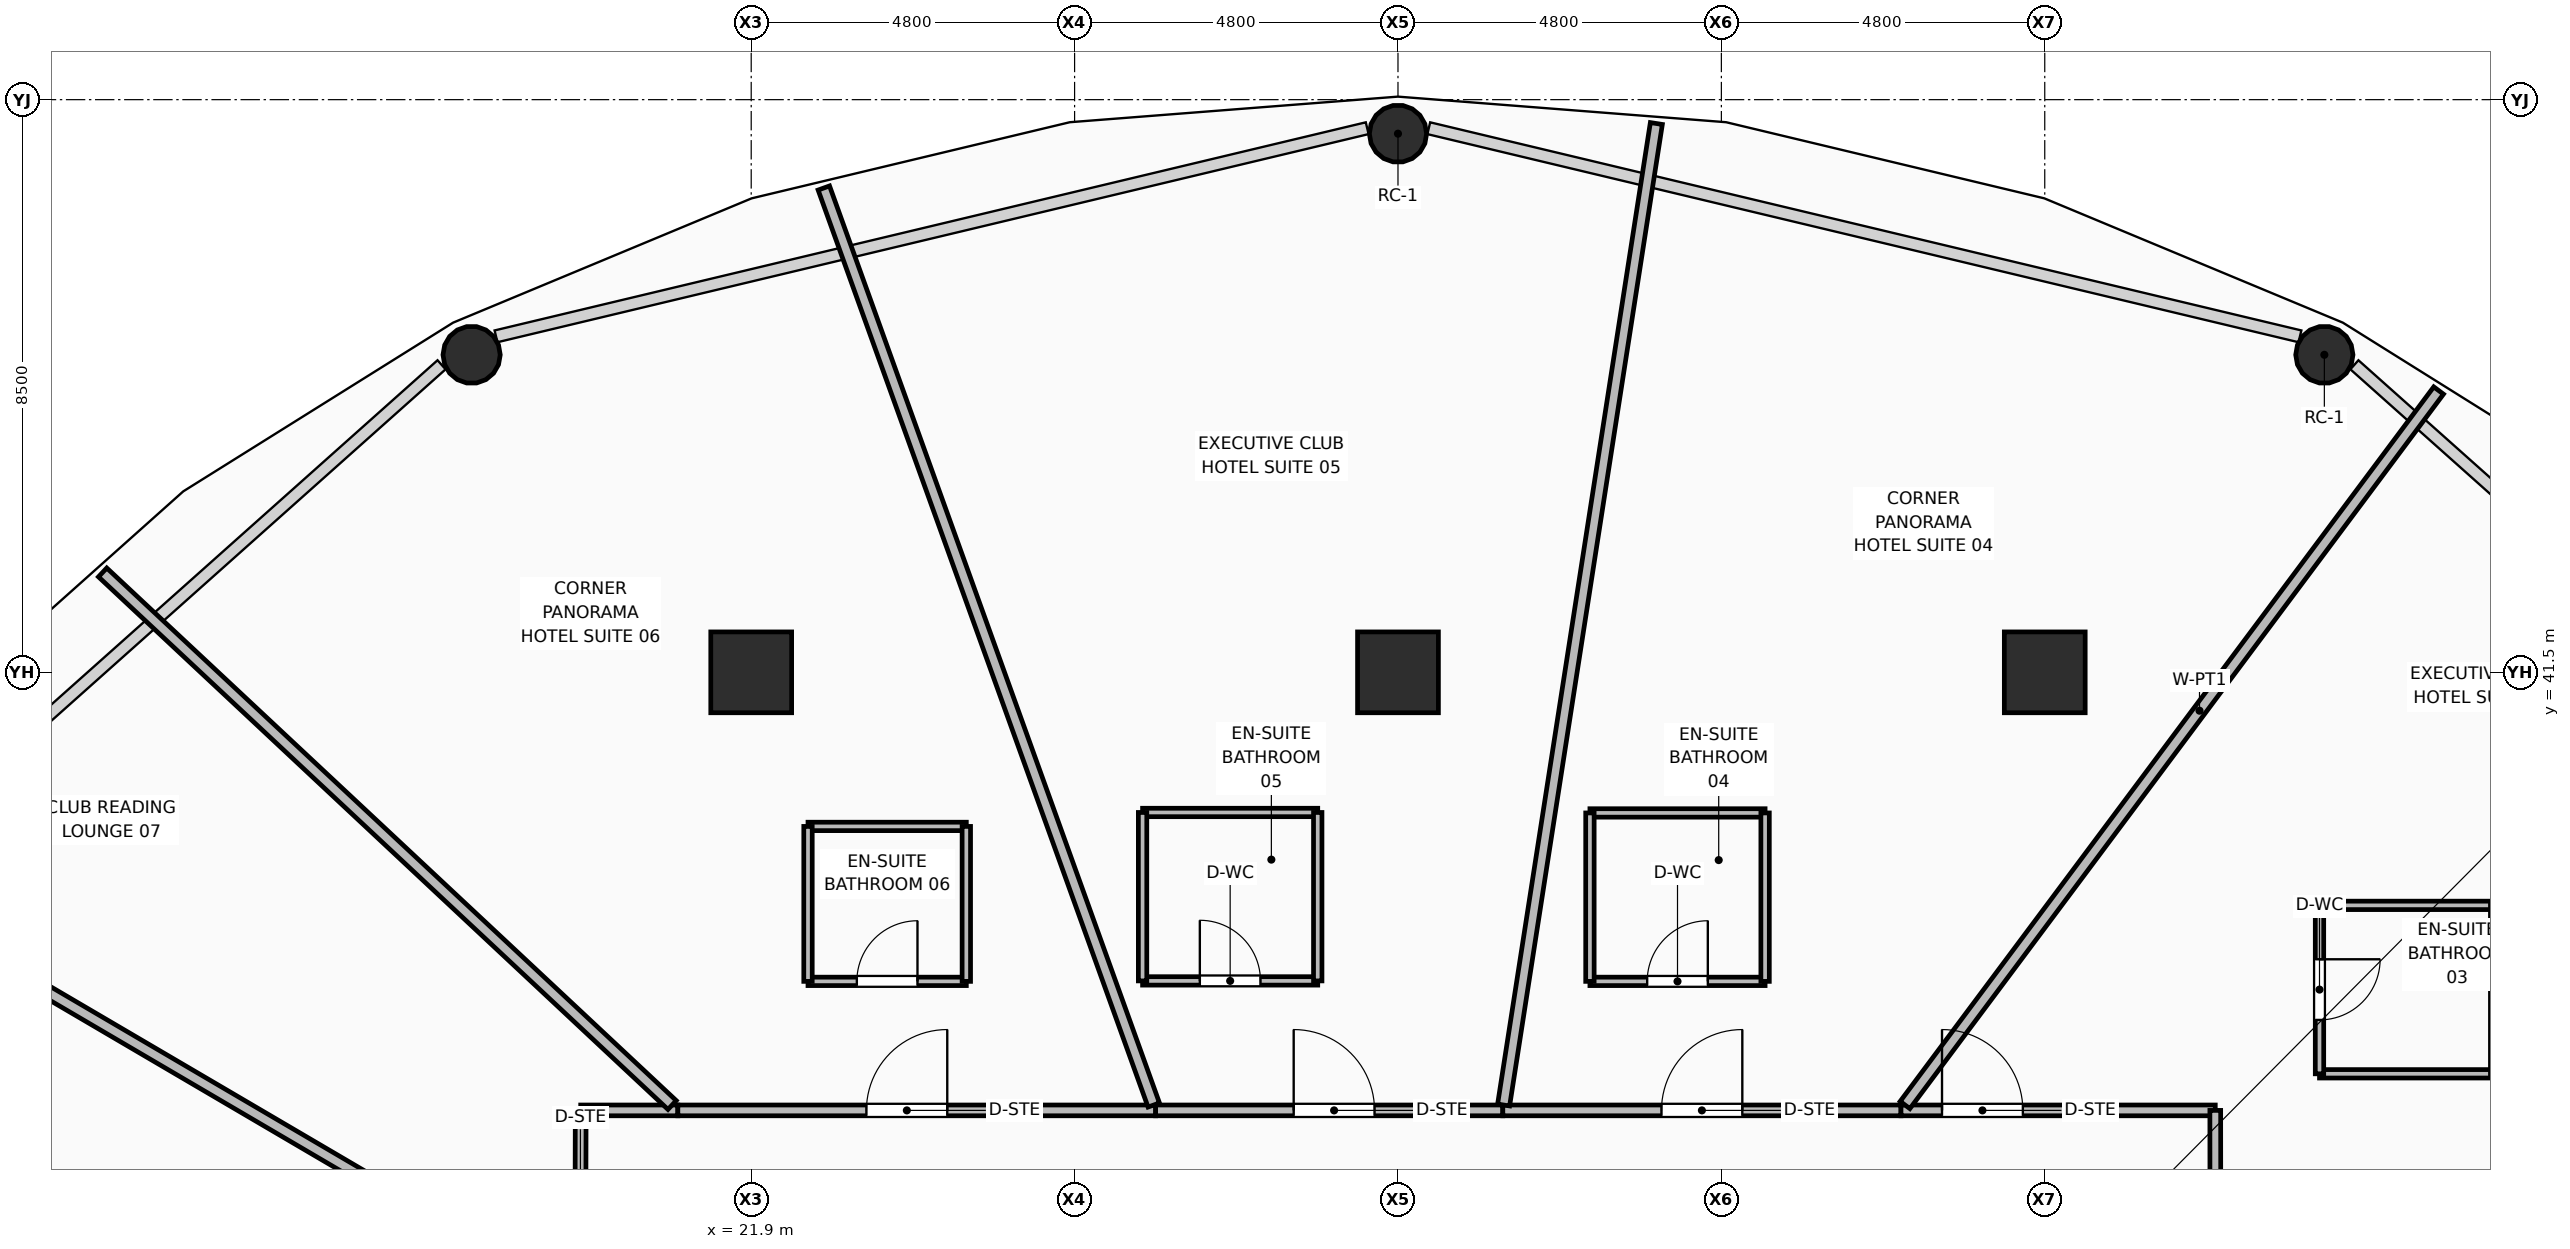
"""IFC4 building model, lengths in metres.
Left out: names, types, materials, properties, quantities, classifications, styles, units other than length and angle.
Written with IfcOpenShell. Run it as: python <this file> out.ifc"""

import sys

from ifc_helpers import new_model, si_unit, direction, frame, frame_2d, origin, origin_2d, place, context, subcontext, project, spatial, rectangle, hollow_rectangle, hollow_circle, extrude, element, fill, save


model = new_model("IFC4")
c1 = context("Model", 3, precision=1e-05, world=origin(), true_north=direction((0.0, 1.0)))
c2 = subcontext(c1, "Body", "Model", "MODEL_VIEW")
j1 = project(units=[si_unit("LENGTHUNIT", "METRE"), si_unit("PLANEANGLEUNIT", "RADIAN")], contexts=[c1])
p1 = place(None, origin())
s1 = spatial("IfcSite", under=j1, at=p1, CompositionType="ELEMENT")
p2 = place(p1, origin())
s2 = spatial("IfcBuilding", under=s1, at=p2, CompositionType="ELEMENT")
p3 = place(p2, frame((0.0, 0.0, 79.5)))
s3 = spatial("IfcBuildingStorey", under=s2, at=p3, CompositionType="ELEMENT", Elevation=79.5)
for number, where, z_axis, x_axis in (
    (1, (21.9, 41.5, 0.0), (0.0, 0.0, 1.0), (1.0, 0.0, 0.0)),
    (2, (31.5, 41.5, 0.0), (0.0, 0.0, 1.0), (1.0, 0.0, 0.0)),
    (3, (41.1, 41.5, 0.0), (0.0, 0.0, 1.0), (1.0, 0.0, 0.0)),
):
    element("IfcColumn", number, at=place(p3, frame(where, z_axis=z_axis, x_axis=x_axis)), inside=s3, PredefinedType="COLUMN", context=c2, shape_type="SweptSolid", body=[
        extrude(hollow_rectangle(XDim=1.2, YDim=1.2, WallThickness=0.045, at=origin_2d()), origin(), (0.0, 0.0, 1.0), 3.75),
    ])
for number, where, z_axis, x_axis in (
    (4, (45.25, 46.213, 0.0), (0.0, 0.0, 1.0), (1.0, 0.0, 0.0)),
    (5, (31.5, 49.495, 0.0), (0.0, 0.0, 1.0), (1.0, 0.0, 0.0)),
    (6, (17.75, 46.213, 0.0), (0.0, 0.0, 1.0), (1.0, 0.0, 0.0)),
):
    element("IfcColumn", number, at=place(p3, frame(where, z_axis=z_axis, x_axis=x_axis)), inside=s3, PredefinedType="COLUMN", context=c2, shape_type="SweptSolid", body=[
        extrude(hollow_circle(Radius=0.425, WallThickness=0.04, at=origin_2d()), origin(), (0.0, 0.0, 1.0), 3.57),
    ])
p4 = place(p3, frame((19.362, 32.119, 0.0), z_axis=(0.0, 0.0, 1.0), x_axis=(0.002374283141, 0.999997181386, 0.0)))
e7 = element("IfcWall", 7, at=p4, inside=s3, PredefinedType="PARTITIONING", context=c2, shape_type="SweptSolid", body=[
    extrude(rectangle(XDim=2.879, YDim=0.16, at=frame_2d((1.439, 0.0))), origin(), (0.0, 0.0, 1.0), 2.928),
])
p5 = place(p4, frame((0.568, 0.0, 0.0)))
e8 = element("IfcOpeningElement", 8, at=p5, cuts=e7, PredefinedType="OPENING", context=c2, shape_type="SweptSolid", body=[
    extrude(rectangle(XDim=1.2, YDim=2.1, at=frame_2d((0.6, 1.05))), frame((0.0, 0.09, 0.0), z_axis=(0.0, -1.0, 0.0), x_axis=(1.0, 0.0, 0.0)), (0.0, 0.0, 1.0), 0.18),
])
p6 = place(p3, frame((19.369, 34.998, 0.0), z_axis=(0.0, 0.0, 1.0), x_axis=(1.0, 0.0, 0.0)))
e9 = element("IfcWall", 9, at=p6, inside=s3, PredefinedType="PARTITIONING", context=c2, shape_type="SweptSolid", body=[
    extrude(rectangle(XDim=1.442, YDim=0.16, at=frame_2d((0.721, 0.0))), origin(), (0.0, 0.0, 1.0), 3.55),
])
p7 = place(p3, frame((20.811, 34.998, 0.0), z_axis=(0.0, 0.0, 1.0), x_axis=(1.0, 0.0, 0.0)))
e10 = element("IfcWall", 10, at=p7, inside=s3, PredefinedType="PARTITIONING", context=c2, shape_type="SweptSolid", body=[
    extrude(rectangle(XDim=7.092, YDim=0.16, at=frame_2d((3.546, 0.0))), origin(), (0.0, 0.0, 1.0), 2.928),
])
p8 = place(p7, frame((2.799, 0.0, 0.0)))
e11 = element("IfcOpeningElement", 11, at=p8, cuts=e10, PredefinedType="OPENING", context=c2, shape_type="SweptSolid", body=[
    extrude(rectangle(XDim=1.2, YDim=2.1, at=frame_2d((0.6, 1.05))), frame((0.0, 0.09, 0.0), z_axis=(0.0, -1.0, 0.0), x_axis=(1.0, 0.0, 0.0)), (0.0, 0.0, 1.0), 0.18),
])
p9 = place(p3, frame((27.903, 34.998, 0.0), z_axis=(0.0, 0.0, 1.0), x_axis=(1.0, 0.0, 0.0)))
e12 = element("IfcWall", 12, at=p9, inside=s3, PredefinedType="PARTITIONING", context=c2, shape_type="SweptSolid", body=[
    extrude(rectangle(XDim=5.153, YDim=0.16, at=frame_2d((2.576, 0.0))), origin(), (0.0, 0.0, 1.0), 2.928),
])
p10 = place(p9, frame((2.049, 0.0, 0.0)))
e13 = element("IfcOpeningElement", 13, at=p10, cuts=e12, PredefinedType="OPENING", context=c2, shape_type="SweptSolid", body=[
    extrude(rectangle(XDim=1.2, YDim=2.1, at=frame_2d((0.6, 1.05))), frame((0.0, 0.09, 0.0), z_axis=(0.0, -1.0, 0.0), x_axis=(1.0, 0.0, 0.0)), (0.0, 0.0, 1.0), 0.18),
])
p11 = place(p3, frame((33.056, 34.998, 0.0), z_axis=(0.0, 0.0, 1.0), x_axis=(1.0, 0.0, 0.0)))
e14 = element("IfcWall", 14, at=p11, inside=s3, PredefinedType="PARTITIONING", context=c2, shape_type="SweptSolid", body=[
    extrude(rectangle(XDim=5.91, YDim=0.16, at=frame_2d((2.955, 0.0))), origin(), (0.0, 0.0, 1.0), 3.55),
])
p12 = place(p11, frame((2.355, 0.0, 0.0)))
e15 = element("IfcOpeningElement", 15, at=p12, cuts=e14, PredefinedType="OPENING", context=c2, shape_type="SweptSolid", body=[
    extrude(rectangle(XDim=1.2, YDim=2.1, at=frame_2d((0.6, 1.05))), frame((0.0, 0.09, 0.0), z_axis=(0.0, -1.0, 0.0), x_axis=(1.0, 0.0, 0.0)), (0.0, 0.0, 1.0), 0.18),
])
p13 = place(p3, frame((38.966, 34.998, 0.0), z_axis=(0.0, 0.0, 1.0), x_axis=(1.0, 0.0, 0.0)))
e16 = element("IfcWall", 16, at=p13, inside=s3, PredefinedType="PARTITIONING", context=c2, shape_type="SweptSolid", body=[
    extrude(rectangle(XDim=4.665, YDim=0.16, at=frame_2d((2.333, 0.0))), origin(), (0.0, 0.0, 1.0), 2.928),
])
p14 = place(p13, frame((0.609, 0.0, 0.0)))
e17 = element("IfcOpeningElement", 17, at=p14, cuts=e16, PredefinedType="OPENING", context=c2, shape_type="SweptSolid", body=[
    extrude(rectangle(XDim=1.2, YDim=2.1, at=frame_2d((0.6, 1.05))), frame((0.0, 0.09, 0.0), z_axis=(0.0, -1.0, 0.0), x_axis=(1.0, 0.0, 0.0)), (0.0, 0.0, 1.0), 0.18),
])
p15 = place(p3, frame((43.631, 34.998, 0.0), z_axis=(0.0, 0.0, 1.0), x_axis=(0.000858368782, -0.999999631601, 0.0)))
e18 = element("IfcWall", 18, at=p15, inside=s3, PredefinedType="PARTITIONING", context=c2, shape_type="SweptSolid", body=[
    extrude(rectangle(XDim=3.413, YDim=0.16, at=frame_2d((1.707, 0.0))), origin(), (0.0, 0.0, 1.0), 2.928),
])
p16 = place(p3, frame((43.728, 31.636, 0.0), z_axis=(0.0, 0.0, 1.0), x_axis=(0.878890179317, 0.477024163643, 0.0)))
e19 = element("IfcWall", 19, at=p16, inside=s3, PredefinedType="PARTITIONING", context=c2, shape_type="SweptSolid", body=[
    extrude(rectangle(XDim=13.211, YDim=0.18, at=frame_2d((6.605, 0.0))), origin(), (0.0, 0.0, 1.0), 2.775),
])
p17 = place(p3, frame((39.026, 35.078, 0.0), z_axis=(0.0, 0.0, 1.0), x_axis=(0.598366758348, 0.801222330258, 0.0)))
e20 = element("IfcWall", 20, at=p17, inside=s3, PredefinedType="PARTITIONING", context=c2, shape_type="SweptSolid", body=[
    extrude(rectangle(XDim=13.236, YDim=0.18, at=frame_2d((6.618, 0.0))), origin(), (0.0, 0.0, 1.0), 2.775),
])
p18 = place(p3, frame((33.068, 35.078, 0.0), z_axis=(0.0, 0.0, 1.0), x_axis=(0.153752995268, 0.988109314016, 0.0)))
e21 = element("IfcWall", 21, at=p18, inside=s3, PredefinedType="PARTITIONING", context=c2, shape_type="SweptSolid", body=[
    extrude(rectangle(XDim=14.743, YDim=0.18, at=frame_2d((7.372, 0.0))), origin(), (0.0, 0.0, 1.0), 2.775),
])
p19 = place(p3, frame((27.875, 35.078, 0.0), z_axis=(0.0, 0.0, 1.0), x_axis=(-0.338534786173, 0.940953876952, 0.0)))
e22 = element("IfcWall", 22, at=p19, inside=s3, PredefinedType="PARTITIONING", context=c2, shape_type="SweptSolid", body=[
    extrude(rectangle(XDim=14.465, YDim=0.18, at=frame_2d((7.232, 0.0))), origin(), (0.0, 0.0, 1.0), 2.775),
])
p20 = place(p3, frame((20.726, 35.078, 0.0), z_axis=(0.0, 0.0, 1.0), x_axis=(-0.730389203883, 0.683031193176, 0.0)))
e23 = element("IfcWall", 23, at=p20, inside=s3, PredefinedType="PARTITIONING", context=c2, shape_type="SweptSolid", body=[
    extrude(rectangle(XDim=11.573, YDim=0.18, at=frame_2d((5.787, 0.0))), origin(), (0.0, 0.0, 1.0), 2.775),
])
p21 = place(p3, frame((19.272, 32.172, 0.0), z_axis=(0.0, 0.0, 1.0), x_axis=(-0.862584123078, 0.505913659248, 0.0)))
e24 = element("IfcWall", 24, at=p21, inside=s3, PredefinedType="PARTITIONING", context=c2, shape_type="SweptSolid", body=[
    extrude(rectangle(XDim=12.81, YDim=0.18, at=frame_2d((6.405, 0.0))), origin(), (0.0, 0.0, 1.0), 2.775),
])
for number, where, z_axis, x_axis in (
    (25, (45.178, 35.541, 0.0), (0.0, 0.0, 1.0), (1.0, 0.0, 0.0)),
    (26, (45.178, 38.041, 0.0), (0.0, 0.0, 1.0), (1.0, 0.0, 0.0)),
):
    element("IfcWall", number, at=place(p3, frame(where, z_axis=z_axis, x_axis=x_axis)), inside=s3, PredefinedType="PARTITIONING", context=c2, shape_type="SweptSolid", body=[
        extrude(rectangle(XDim=2.6, YDim=0.125, at=frame_2d((1.3, 0.0))), origin(), (0.0, 0.0, 1.0), 3.55),
    ])
p22 = place(p3, frame((45.178, 35.541, 0.0), z_axis=(0.0, 0.0, 1.0), x_axis=(0.0, 1.0, 0.0)))
e27 = element("IfcWall", 27, at=p22, inside=s3, PredefinedType="PARTITIONING", context=c2, shape_type="SweptSolid", body=[
    extrude(rectangle(XDim=2.5, YDim=0.125, at=frame_2d((1.25, 0.0))), origin(), (0.0, 0.0, 1.0), 3.55),
])
p23 = place(p22, frame((0.8, 0.0, 0.0)))
e28 = element("IfcOpeningElement", 28, at=p23, cuts=e27, PredefinedType="OPENING", context=c2, shape_type="SweptSolid", body=[
    extrude(rectangle(XDim=0.9, YDim=2.1, at=frame_2d((0.45, 1.05))), frame((0.0, 0.073, 0.0), z_axis=(0.0, -1.0, 0.0), x_axis=(1.0, 0.0, 0.0)), (0.0, 0.0, 1.0), 0.145),
])
p24 = place(p3, frame((47.778, 35.541, 0.0), z_axis=(0.0, 0.0, 1.0), x_axis=(0.0, 1.0, 0.0)))
e29 = element("IfcWall", 29, at=p24, inside=s3, PredefinedType="PARTITIONING", context=c2, shape_type="SweptSolid", body=[
    extrude(rectangle(XDim=2.5, YDim=0.125, at=frame_2d((1.25, 0.0))), origin(), (0.0, 0.0, 1.0), 3.55),
])
p25 = place(p3, frame((34.349, 36.913, 0.0), z_axis=(0.0, 0.0, 1.0), x_axis=(1.0, 0.0, 0.0)))
e30 = element("IfcWall", 30, at=p25, inside=s3, PredefinedType="PARTITIONING", context=c2, shape_type="SweptSolid", body=[
    extrude(rectangle(XDim=2.6, YDim=0.125, at=frame_2d((1.3, 0.0))), origin(), (0.0, 0.0, 1.0), 3.55),
])
p26 = place(p25, frame((0.85, 0.0, 0.0)))
e31 = element("IfcOpeningElement", 31, at=p26, cuts=e30, PredefinedType="OPENING", context=c2, shape_type="SweptSolid", body=[
    extrude(rectangle(XDim=0.9, YDim=2.1, at=frame_2d((0.45, 1.05))), frame((0.0, 0.073, 0.0), z_axis=(0.0, -1.0, 0.0), x_axis=(1.0, 0.0, 0.0)), (0.0, 0.0, 1.0), 0.145),
])
p27 = place(p3, frame((34.349, 39.413, 0.0), z_axis=(0.0, 0.0, 1.0), x_axis=(1.0, 0.0, 0.0)))
e32 = element("IfcWall", 32, at=p27, inside=s3, PredefinedType="PARTITIONING", context=c2, shape_type="SweptSolid", body=[
    extrude(rectangle(XDim=2.6, YDim=0.125, at=frame_2d((1.3, 0.0))), origin(), (0.0, 0.0, 1.0), 3.55),
])
for number, where, z_axis, x_axis in (
    (33, (34.349, 36.913, 0.0), (0.0, 0.0, 1.0), (0.0, 1.0, 0.0)),
    (34, (36.949, 36.913, 0.0), (0.0, 0.0, 1.0), (0.0, 1.0, 0.0)),
):
    element("IfcWall", number, at=place(p3, frame(where, z_axis=z_axis, x_axis=x_axis)), inside=s3, PredefinedType="PARTITIONING", context=c2, shape_type="SweptSolid", body=[
        extrude(rectangle(XDim=2.5, YDim=0.125, at=frame_2d((1.25, 0.0))), origin(), (0.0, 0.0, 1.0), 3.55),
    ])
p28 = place(p3, frame((27.709, 36.92, 0.0), z_axis=(0.0, 0.0, 1.0), x_axis=(1.0, 0.0, 0.0)))
e35 = element("IfcWall", 35, at=p28, inside=s3, PredefinedType="PARTITIONING", context=c2, shape_type="SweptSolid", body=[
    extrude(rectangle(XDim=2.6, YDim=0.125, at=frame_2d((1.3, 0.0))), origin(), (0.0, 0.0, 1.0), 3.55),
])
p29 = place(p28, frame((0.85, 0.0, 0.0)))
e36 = element("IfcOpeningElement", 36, at=p29, cuts=e35, PredefinedType="OPENING", context=c2, shape_type="SweptSolid", body=[
    extrude(rectangle(XDim=0.9, YDim=2.1, at=frame_2d((0.45, 1.05))), frame((0.0, 0.073, 0.0), z_axis=(0.0, -1.0, 0.0), x_axis=(1.0, 0.0, 0.0)), (0.0, 0.0, 1.0), 0.145),
])
p30 = place(p3, frame((27.709, 39.42, 0.0), z_axis=(0.0, 0.0, 1.0), x_axis=(1.0, 0.0, 0.0)))
e37 = element("IfcWall", 37, at=p30, inside=s3, PredefinedType="PARTITIONING", context=c2, shape_type="SweptSolid", body=[
    extrude(rectangle(XDim=2.6, YDim=0.125, at=frame_2d((1.3, 0.0))), origin(), (0.0, 0.0, 1.0), 3.55),
])
for number, where, z_axis, x_axis in (
    (38, (27.709, 36.92, 0.0), (0.0, 0.0, 1.0), (0.0, 1.0, 0.0)),
    (39, (30.309, 36.92, 0.0), (0.0, 0.0, 1.0), (0.0, 1.0, 0.0)),
):
    element("IfcWall", number, at=place(p3, frame(where, z_axis=z_axis, x_axis=x_axis)), inside=s3, PredefinedType="PARTITIONING", context=c2, shape_type="SweptSolid", body=[
        extrude(rectangle(XDim=2.5, YDim=0.125, at=frame_2d((1.25, 0.0))), origin(), (0.0, 0.0, 1.0), 3.55),
    ])
p31 = place(p3, frame((22.743, 36.913, 0.0), z_axis=(0.0, 0.0, 1.0), x_axis=(1.0, 0.0, 0.0)))
e40 = element("IfcWall", 40, at=p31, inside=s3, PredefinedType="PARTITIONING", context=c2, shape_type="SweptSolid", body=[
    extrude(rectangle(XDim=2.35, YDim=0.125, at=frame_2d((1.175, 0.0))), origin(), (0.0, 0.0, 1.0), 3.55),
])
p32 = place(p31, frame((0.725, 0.0, 0.0)))
e41 = element("IfcOpeningElement", 41, at=p32, cuts=e40, PredefinedType="OPENING", context=c2, shape_type="SweptSolid", body=[
    extrude(rectangle(XDim=0.9, YDim=2.1, at=frame_2d((0.45, 1.05))), frame((0.0, 0.073, 0.0), z_axis=(0.0, -1.0, 0.0), x_axis=(1.0, 0.0, 0.0)), (0.0, 0.0, 1.0), 0.145),
])
p33 = place(p3, frame((22.743, 39.213, 0.0), z_axis=(0.0, 0.0, 1.0), x_axis=(1.0, 0.0, 0.0)))
e42 = element("IfcWall", 42, at=p33, inside=s3, PredefinedType="PARTITIONING", context=c2, shape_type="SweptSolid", body=[
    extrude(rectangle(XDim=2.35, YDim=0.125, at=frame_2d((1.175, 0.0))), origin(), (0.0, 0.0, 1.0), 3.55),
])
for number, where, z_axis, x_axis in (
    (43, (22.743, 36.913, 0.0), (0.0, 0.0, 1.0), (0.0, 1.0, 0.0)),
    (44, (25.093, 36.913, 0.0), (0.0, 0.0, 1.0), (0.0, 1.0, 0.0)),
):
    element("IfcWall", number, at=place(p3, frame(where, z_axis=z_axis, x_axis=x_axis)), inside=s3, PredefinedType="PARTITIONING", context=c2, shape_type="SweptSolid", body=[
        extrude(rectangle(XDim=2.3, YDim=0.125, at=frame_2d((1.15, 0.0))), origin(), (0.0, 0.0, 1.0), 3.55),
    ])
p34 = place(p23, frame((0.9, 0.0, 0.0), z_axis=(0.0, 0.0, 1.0), x_axis=(-1.0, 0.0, 0.0)))
e45 = element("IfcDoor", 45, at=p34, inside=s3, OperationType="SINGLE_SWING_LEFT", PredefinedType="DOOR", context=c2, shape_type="SweptSolid", body=[
    extrude(rectangle(XDim=0.9, YDim=2.1, at=frame_2d((0.45, 1.05))), frame((0.0, 0.025, 0.0), z_axis=(0.0, -1.0, 0.0), x_axis=(1.0, 0.0, 0.0)), (0.0, 0.0, 1.0), 0.05),
])
fill(e28, e45)
p35 = place(p14, origin())
e46 = element("IfcDoor", 46, at=p35, inside=s3, OperationType="SINGLE_SWING_LEFT", PredefinedType="DOOR", context=c2, shape_type="SweptSolid", body=[
    extrude(rectangle(XDim=1.2, YDim=2.1, at=frame_2d((0.6, 1.05))), frame((0.0, 0.025, 0.0), z_axis=(0.0, -1.0, 0.0), x_axis=(1.0, 0.0, 0.0)), (0.0, 0.0, 1.0), 0.05),
])
fill(e17, e46)
p36 = place(p26, origin())
e47 = element("IfcDoor", 47, at=p36, inside=s3, OperationType="SINGLE_SWING_RIGHT", PredefinedType="DOOR", context=c2, shape_type="SweptSolid", body=[
    extrude(rectangle(XDim=0.9, YDim=2.1, at=frame_2d((0.45, 1.05))), frame((0.0, 0.025, 0.0), z_axis=(0.0, -1.0, 0.0), x_axis=(1.0, 0.0, 0.0)), (0.0, 0.0, 1.0), 0.05),
])
fill(e31, e47)
p37 = place(p12, origin())
e48 = element("IfcDoor", 48, at=p37, inside=s3, OperationType="SINGLE_SWING_RIGHT", PredefinedType="DOOR", context=c2, shape_type="SweptSolid", body=[
    extrude(rectangle(XDim=1.2, YDim=2.1, at=frame_2d((0.6, 1.05))), frame((0.0, 0.025, 0.0), z_axis=(0.0, -1.0, 0.0), x_axis=(1.0, 0.0, 0.0)), (0.0, 0.0, 1.0), 0.05),
])
fill(e15, e48)
p38 = place(p29, origin())
e49 = element("IfcDoor", 49, at=p38, inside=s3, OperationType="SINGLE_SWING_LEFT", PredefinedType="DOOR", context=c2, shape_type="SweptSolid", body=[
    extrude(rectangle(XDim=0.9, YDim=2.1, at=frame_2d((0.45, 1.05))), frame((0.0, 0.025, 0.0), z_axis=(0.0, -1.0, 0.0), x_axis=(1.0, 0.0, 0.0)), (0.0, 0.0, 1.0), 0.05),
])
fill(e36, e49)
p39 = place(p10, origin())
e50 = element("IfcDoor", 50, at=p39, inside=s3, OperationType="SINGLE_SWING_LEFT", PredefinedType="DOOR", context=c2, shape_type="SweptSolid", body=[
    extrude(rectangle(XDim=1.2, YDim=2.1, at=frame_2d((0.6, 1.05))), frame((0.0, 0.025, 0.0), z_axis=(0.0, -1.0, 0.0), x_axis=(1.0, 0.0, 0.0)), (0.0, 0.0, 1.0), 0.05),
])
fill(e13, e50)
p40 = place(p32, origin())
e51 = element("IfcDoor", 51, at=p40, inside=s3, OperationType="SINGLE_SWING_RIGHT", PredefinedType="DOOR", context=c2, shape_type="SweptSolid", body=[
    extrude(rectangle(XDim=0.9, YDim=2.1, at=frame_2d((0.45, 1.05))), frame((0.0, 0.025, 0.0), z_axis=(0.0, -1.0, 0.0), x_axis=(1.0, 0.0, 0.0)), (0.0, 0.0, 1.0), 0.05),
])
fill(e41, e51)
p41 = place(p8, origin())
e52 = element("IfcDoor", 52, at=p41, inside=s3, OperationType="SINGLE_SWING_RIGHT", PredefinedType="DOOR", context=c2, shape_type="SweptSolid", body=[
    extrude(rectangle(XDim=1.2, YDim=2.1, at=frame_2d((0.6, 1.05))), frame((0.0, 0.025, 0.0), z_axis=(0.0, -1.0, 0.0), x_axis=(1.0, 0.0, 0.0)), (0.0, 0.0, 1.0), 0.05),
])
fill(e11, e52)
save(model, sys.argv[1])
